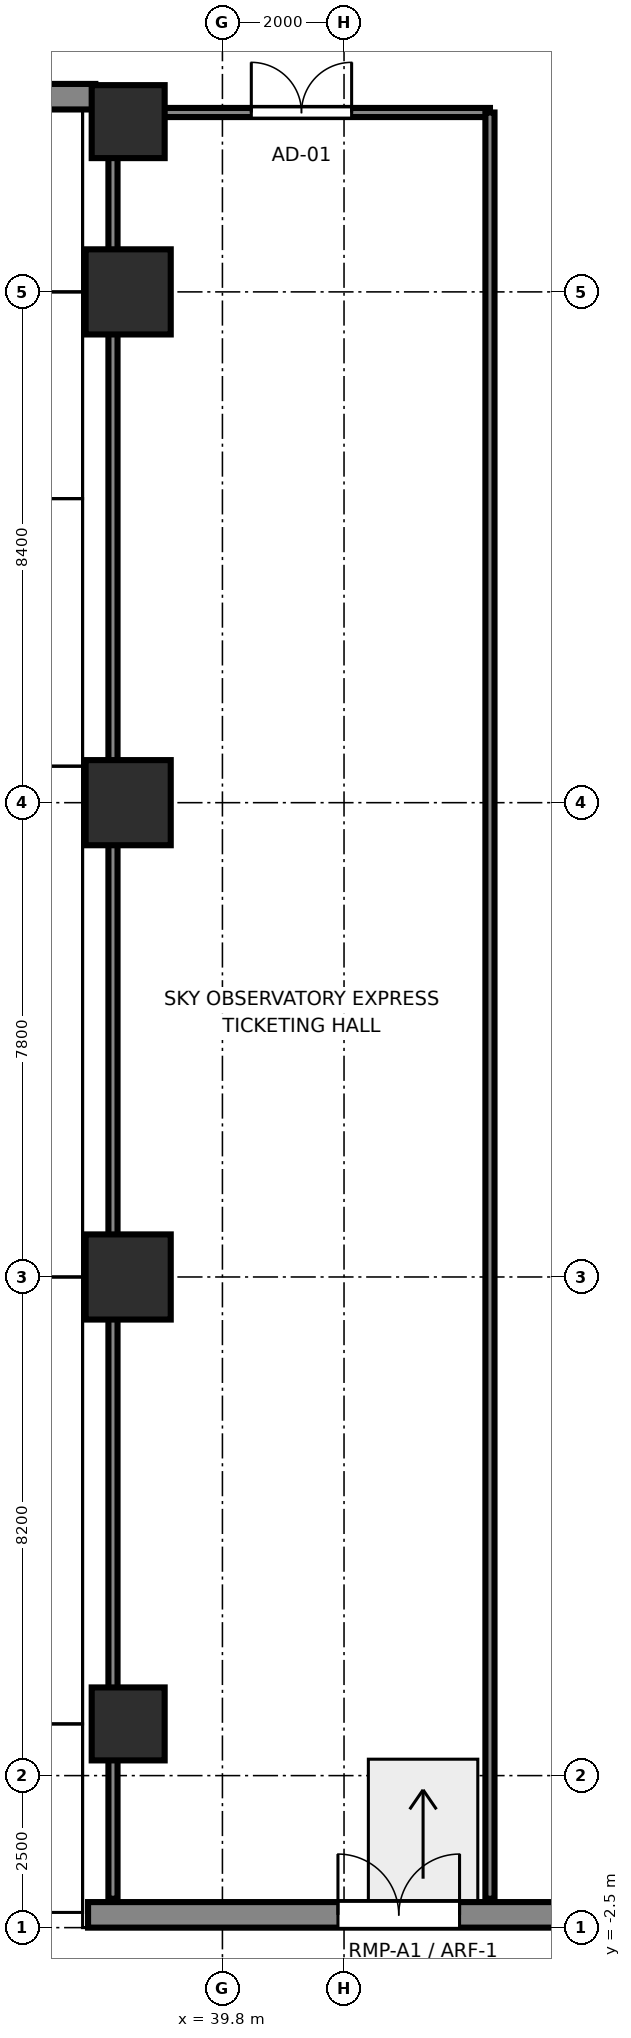
"""IFC4 building model, lengths in metres.
Left out: names, types, materials, properties, quantities, classifications, styles, units other than length and angle.
Written with IfcOpenShell. Run it as: python <this file> out.ifc"""

import sys

from ifc_helpers import new_model, si_unit, direction, frame, frame_2d, origin, origin_2d, place, context, subcontext, project, spatial, rectangle, circle, extrude, source, transform, mapped, element, fill, save


model = new_model("IFC4")
c1 = context("Model", 3, precision=1e-05, world=origin(), true_north=direction((0.0, 1.0)))
c2 = subcontext(c1, "Body", "Model", "MODEL_VIEW")
j1 = project(units=[si_unit("LENGTHUNIT", "METRE"), si_unit("PLANEANGLEUNIT", "RADIAN")], contexts=[c1])
p1 = place(None, origin())
s1 = spatial("IfcSite", under=j1, at=p1, CompositionType="ELEMENT")
p2 = place(p1, origin())
s2 = spatial("IfcBuilding", under=s1, at=p2, CompositionType="ELEMENT")
p3 = place(p2, origin())
s3 = spatial("IfcBuildingStorey", under=s2, at=p3, CompositionType="ELEMENT", Elevation=0.0)
m1 = source(origin(), c2, "Body", "SweptSolid", [
    extrude(circle(Radius=0.6, at=origin_2d()), origin(), (0.0, 0.0, 1.0), 6.0),
])
p4 = place(p3, frame((38.25, 0.85, 0.0), z_axis=(0.0, 0.0, 1.0), x_axis=(1.0, 0.0, 0.0)))
e1 = element("IfcColumn", 1, at=p4, inside=s3, PredefinedType="COLUMN", context=c2, shape_type="MappedRepresentation", body=[
    mapped(m1, transform((0.0, 0.0, 0.0), x_axis=(1.0, 0.0, 0.0), y_axis=(0.0, 1.0, 0.0), z_axis=(0.0, 0.0, 1.0), scale=1.0)),
])
m2 = source(origin(), c2, "Body", "SweptSolid", [
    extrude(rectangle(XDim=1.4, YDim=1.4, at=origin_2d()), origin(), (0.0, 0.0, 1.0), 6.0),
])
for number, where, z_axis, x_axis in (
    (2, (38.25, 8.2, 0.0), (0.0, 0.0, 1.0), (1.0, 0.0, 0.0)),
    (3, (38.25, 16.0, 0.0), (0.0, 0.0, 1.0), (1.0, 0.0, 0.0)),
    (4, (38.25, 24.4, 0.0), (0.0, 0.0, 1.0), (1.0, 0.0, 0.0)),
):
    element("IfcColumn", number, at=place(p3, frame(where, z_axis=z_axis, x_axis=x_axis)), inside=s3, PredefinedType="COLUMN", context=c2, shape_type="MappedRepresentation", body=[
        mapped(m2, transform((0.0, 0.0, 0.0), x_axis=(1.0, 0.0, 0.0), y_axis=(0.0, 1.0, 0.0), z_axis=(0.0, 0.0, 1.0), scale=1.0)),
    ])
p5 = place(p3, frame((38.25, 27.2, 0.0), z_axis=(0.0, 0.0, 1.0), x_axis=(1.0, 0.0, 0.0)))
e5 = element("IfcColumn", 5, at=p5, inside=s3, PredefinedType="COLUMN", context=c2, shape_type="MappedRepresentation", body=[
    mapped(m1, transform((0.0, 0.0, 0.0), x_axis=(1.0, 0.0, 0.0), y_axis=(0.0, 1.0, 0.0), z_axis=(0.0, 0.0, 1.0), scale=1.0)),
])
p6 = place(p3, frame((19.29, 27.61, 0.0), z_axis=(0.0, 0.0, 1.0), x_axis=(1.0, 0.0, 0.0)))
e6 = element("IfcWall", 6, at=p6, inside=s3, PredefinedType="SOLIDWALL", context=c2, shape_type="SweptSolid", body=[
    extrude(rectangle(XDim=18.42, YDim=0.42, at=frame_2d((9.21, 0.0))), origin(), (0.0, 0.0, 1.0), 5.74),
])
p7 = place(p6, frame((1.97, 0.0, 0.65)))
e7 = element("IfcOpeningElement", 7, at=p7, cuts=e6, PredefinedType="OPENING", context=c2, shape_type="SweptSolid", body=[
    extrude(rectangle(XDim=3.0, YDim=2.5, at=frame_2d((1.5, 1.25))), frame((0.0, 0.22, 0.0), z_axis=(0.0, -1.0, 0.0), x_axis=(1.0, 0.0, 0.0)), (0.0, 0.0, 1.0), 0.44),
])
p8 = place(p6, frame((7.71, 0.0, 0.65)))
e8 = element("IfcOpeningElement", 8, at=p8, cuts=e6, PredefinedType="OPENING", context=c2, shape_type="SweptSolid", body=[
    extrude(rectangle(XDim=3.0, YDim=2.5, at=frame_2d((1.5, 1.25))), frame((0.0, 0.22, 0.0), z_axis=(0.0, -1.0, 0.0), x_axis=(1.0, 0.0, 0.0)), (0.0, 0.0, 1.0), 0.44),
])
p9 = place(p6, frame((13.45, 0.0, 0.65)))
e9 = element("IfcOpeningElement", 9, at=p9, cuts=e6, PredefinedType="OPENING", context=c2, shape_type="SweptSolid", body=[
    extrude(rectangle(XDim=3.0, YDim=2.5, at=frame_2d((1.5, 1.25))), frame((0.0, 0.22, 0.0), z_axis=(0.0, -1.0, 0.0), x_axis=(1.0, 0.0, 0.0)), (0.0, 0.0, 1.0), 0.44),
])
p10 = place(p3, frame((37.59, -2.29, 0.0), z_axis=(0.0, 0.0, 1.0), x_axis=(1.0, 0.0, 0.0)))
e10 = element("IfcWall", 10, at=p10, inside=s3, PredefinedType="SOLIDWALL", context=c2, shape_type="SweptSolid", body=[
    extrude(rectangle(XDim=27.6, YDim=0.42, at=frame_2d((13.8, 0.0))), origin(), (0.0, 0.0, 1.0), 5.74),
])
p11 = place(p10, frame((6.11, 0.0, 0.0), z_axis=(0.0, 0.0, 1.0), x_axis=(-1.0, 0.0, 0.0)))
e11 = element("IfcOpeningElement", 11, at=p11, cuts=e10, PredefinedType="OPENING", context=c2, shape_type="SweptSolid", body=[
    extrude(rectangle(XDim=2.0, YDim=2.25, at=frame_2d((1.0, 1.125))), frame((0.0, 0.22, 0.0), z_axis=(0.0, -1.0, 0.0), x_axis=(1.0, 0.0, 0.0)), (0.0, 0.0, 1.0), 0.44),
])
p12 = place(p10, frame((15.21, 0.0, 0.0), z_axis=(0.0, 0.0, 1.0), x_axis=(-1.0, 0.0, 0.0)))
e12 = element("IfcOpeningElement", 12, at=p12, cuts=e10, PredefinedType="OPENING", context=c2, shape_type="SweptSolid", body=[
    extrude(rectangle(XDim=2.0, YDim=2.25, at=frame_2d((1.0, 1.125))), frame((0.0, 0.22, 0.0), z_axis=(0.0, -1.0, 0.0), x_axis=(1.0, 0.0, 0.0)), (0.0, 0.0, 1.0), 0.44),
])
p13 = place(p10, frame((24.01, 0.0, 0.0), z_axis=(0.0, 0.0, 1.0), x_axis=(-1.0, 0.0, 0.0)))
e13 = element("IfcOpeningElement", 13, at=p13, cuts=e10, PredefinedType="OPENING", context=c2, shape_type="SweptSolid", body=[
    extrude(rectangle(XDim=2.0, YDim=2.25, at=frame_2d((1.0, 1.125))), frame((0.0, 0.22, 0.0), z_axis=(0.0, -1.0, 0.0), x_axis=(1.0, 0.0, 0.0)), (0.0, 0.0, 1.0), 0.44),
])
p14 = place(p3, frame((38.0, 27.35, 0.0), z_axis=(0.0, 0.0, 1.0), x_axis=(1.0, 0.0, 0.0)))
e14 = element("IfcWall", 14, at=p14, inside=s3, PredefinedType="PARTITIONING", context=c2, shape_type="SweptSolid", body=[
    extrude(rectangle(XDim=6.2, YDim=0.15, at=frame_2d((3.1, 0.0))), origin(), (0.0, 0.0, 1.0), 5.74),
])
p15 = place(p14, frame((2.275, 0.0, 0.0)))
e15 = element("IfcOpeningElement", 15, at=p15, cuts=e14, PredefinedType="OPENING", context=c2, shape_type="SweptSolid", body=[
    extrude(rectangle(XDim=1.65, YDim=2.15, at=frame_2d((0.825, 1.075))), frame((0.0, 0.085, 0.0), z_axis=(0.0, -1.0, 0.0), x_axis=(1.0, 0.0, 0.0)), (0.0, 0.0, 1.0), 0.17),
])
p16 = place(p3, frame((38.0, -2.025, 0.0), z_axis=(0.0, 0.0, 1.0), x_axis=(0.0, 1.0, 0.0)))
e16 = element("IfcWall", 16, at=p16, inside=s3, PredefinedType="PARTITIONING", context=c2, shape_type="SweptSolid", body=[
    extrude(rectangle(XDim=29.425, YDim=0.15, at=frame_2d((14.712, 0.0))), origin(), (0.0, 0.0, 1.0), 5.74),
])
p17 = place(p3, frame((44.2, -2.025, 0.0), z_axis=(0.0, 0.0, 1.0), x_axis=(0.0, 1.0, 0.0)))
e17 = element("IfcWall", 17, at=p17, inside=s3, PredefinedType="PARTITIONING", context=c2, shape_type="SweptSolid", body=[
    extrude(rectangle(XDim=29.375, YDim=0.15, at=frame_2d((14.688, 0.0))), origin(), (0.0, 0.0, 1.0), 5.276),
])
m3 = source(origin(), c2, "Body", "SweptSolid", [
    extrude(rectangle(XDim=2.0, YDim=2.25, at=frame_2d((1.0, 1.125))), frame((0.0, 0.025, 0.0), z_axis=(0.0, -1.0, 0.0), x_axis=(1.0, 0.0, 0.0)), (0.0, 0.0, 1.0), 0.05),
])
p18 = place(p11, origin())
e18 = element("IfcDoor", 18, at=p18, inside=s3, OperationType="DOUBLE_DOOR_SINGLE_SWING", PredefinedType="DOOR", context=c2, shape_type="MappedRepresentation", body=[
    mapped(m3, transform((0.0, 0.0, 0.0), x_axis=(1.0, 0.0, 0.0), y_axis=(0.0, 1.0, 0.0), z_axis=(0.0, 0.0, 1.0), scale=1.0)),
])
fill(e11, e18)
m4 = source(origin(), c2, "Body", "SweptSolid", [
    extrude(rectangle(XDim=1.65, YDim=2.15, at=frame_2d((0.825, 1.075))), frame((0.0, 0.025, 0.0), z_axis=(0.0, -1.0, 0.0), x_axis=(1.0, 0.0, 0.0)), (0.0, 0.0, 1.0), 0.05),
])
p19 = place(p15, origin())
e19 = element("IfcDoor", 19, at=p19, inside=s3, OperationType="DOUBLE_DOOR_SINGLE_SWING", PredefinedType="DOOR", context=c2, shape_type="MappedRepresentation", body=[
    mapped(m4, transform((0.0, 0.0, 0.0), x_axis=(1.0, 0.0, 0.0), y_axis=(0.0, 1.0, 0.0), z_axis=(0.0, 0.0, 1.0), scale=1.0)),
])
fill(e15, e19)
save(model, sys.argv[1])
